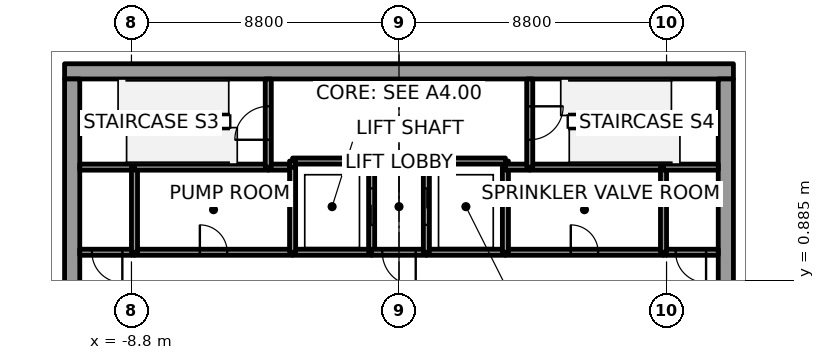
"""IFC4 building model, lengths in metres.
Left out: names, types, materials, properties, quantities, classifications, styles, units other than length and angle.
Written with IfcOpenShell. Run it as: python <this file> out.ifc"""

import sys

from ifc_helpers import new_model, si_unit, direction, frame, frame_2d, origin, place, context, subcontext, project, spatial, rectangle, extrude, element, fill, save


model = new_model("IFC4")
c1 = context("Model", 3, precision=1e-05, world=origin(), true_north=direction((0.0, 1.0)))
c2 = subcontext(c1, "Body", "Model", "MODEL_VIEW")
j1 = project(units=[si_unit("LENGTHUNIT", "METRE"), si_unit("PLANEANGLEUNIT", "RADIAN")], contexts=[c1])
p1 = place(None, origin())
s1 = spatial("IfcSite", under=j1, at=p1, CompositionType="ELEMENT")
p2 = place(p1, origin())
s2 = spatial("IfcBuilding", under=s1, at=p2, CompositionType="ELEMENT")
p3 = place(p2, frame((0.0, 0.0, -9.0)))
s3 = spatial("IfcBuildingStorey", under=s2, at=p3, CompositionType="ELEMENT", Elevation=-9.0)
p4 = place(p3, frame((-11.0, 7.75, 0.0), z_axis=(0.0, 0.0, 1.0), x_axis=(1.0, 0.0, 0.0)))
e1 = element("IfcWall", 1, at=p4, inside=s3, PredefinedType="SHEAR", context=c2, shape_type="SweptSolid", body=[
    extrude(rectangle(XDim=22.0, YDim=0.5, at=frame_2d((11.0, 0.0))), origin(), (0.0, 0.0, 1.0), 4.5),
])
for number, where, z_axis, x_axis in (
    (2, (-10.75, -7.5, 0.0), (0.0, 0.0, 1.0), (0.0, 1.0, 0.0)),
    (3, (10.75, -7.5, 0.0), (0.0, 0.0, 1.0), (0.0, 1.0, 0.0)),
):
    element("IfcWall", number, at=place(p3, frame(where, z_axis=z_axis, x_axis=x_axis)), inside=s3, PredefinedType="SHEAR", context=c2, shape_type="SweptSolid", body=[
        extrude(rectangle(XDim=15.0, YDim=0.5, at=frame_2d((7.5, 0.0))), origin(), (0.0, 0.0, 1.0), 4.5),
    ])
p5 = place(p3, frame((-8.7, 1.8, 0.0), z_axis=(0.0, 0.0, 1.0), x_axis=(-1.0, 0.0, 0.0)))
e4 = element("IfcWall", 4, at=p5, inside=s3, PredefinedType="SOLIDWALL", context=c2, shape_type="SweptSolid", body=[
    extrude(rectangle(XDim=1.8, YDim=0.2, at=frame_2d((0.9, 0.0))), origin(), (0.0, 0.0, 1.0), 4.35),
])
p6 = place(p5, frame((0.4, 0.0, 0.0)))
e5 = element("IfcOpeningElement", 5, at=p6, cuts=e4, PredefinedType="OPENING", context=c2, shape_type="SweptSolid", body=[
    extrude(rectangle(XDim=1.0, YDim=2.4, at=frame_2d((0.5, 1.2))), frame((0.0, 0.1, 0.0), z_axis=(0.0, -1.0, 0.0), x_axis=(1.0, 0.0, 0.0)), (0.0, 0.0, 1.0), 0.2),
])
p7 = place(p3, frame((-8.7, 4.6, 0.0), z_axis=(0.0, 0.0, 1.0), x_axis=(-1.0, 0.0, 0.0)))
e6 = element("IfcWall", 6, at=p7, inside=s3, PredefinedType="SOLIDWALL", context=c2, shape_type="SweptSolid", body=[
    extrude(rectangle(XDim=1.8, YDim=0.2, at=frame_2d((0.9, 0.0))), origin(), (0.0, 0.0, 1.0), 4.35),
])
p8 = place(p3, frame((-8.7, 1.8, 0.0), z_axis=(0.0, 0.0, 1.0), x_axis=(1.0, 0.0, 0.0)))
e7 = element("IfcWall", 7, at=p8, inside=s3, PredefinedType="SOLIDWALL", context=c2, shape_type="SweptSolid", body=[
    extrude(rectangle(XDim=5.2, YDim=0.2, at=frame_2d((2.6, 0.0))), origin(), (0.0, 0.0, 1.0), 4.35),
])
p9 = place(p8, frame((2.15, 0.0, 0.0)))
e8 = element("IfcOpeningElement", 8, at=p9, cuts=e7, PredefinedType="OPENING", context=c2, shape_type="SweptSolid", body=[
    extrude(rectangle(XDim=0.9, YDim=2.4, at=frame_2d((0.45, 1.2))), frame((0.0, 0.1, 0.0), z_axis=(0.0, -1.0, 0.0), x_axis=(1.0, 0.0, 0.0)), (0.0, 0.0, 1.0), 0.2),
])
p10 = place(p3, frame((-8.7, 4.6, 0.0), z_axis=(0.0, 0.0, 1.0), x_axis=(0.0, -1.0, 0.0)))
e9 = element("IfcWall", 9, at=p10, inside=s3, PredefinedType="SOLIDWALL", context=c2, shape_type="SweptSolid", body=[
    extrude(rectangle(XDim=2.8, YDim=0.2, at=frame_2d((1.4, 0.0))), origin(), (0.0, 0.0, 1.0), 4.35),
])
p11 = place(p3, frame((-4.3, 4.6, 0.0), z_axis=(0.0, 0.0, 1.0), x_axis=(-1.0, 0.0, 0.0)))
e10 = element("IfcWall", 10, at=p11, inside=s3, PredefinedType="SOLIDWALL", context=c2, shape_type="SweptSolid", body=[
    extrude(rectangle(XDim=4.4, YDim=0.2, at=frame_2d((2.2, 0.0))), origin(), (0.0, 0.0, 1.0), 4.35),
])
p12 = place(p3, frame((-3.5, 4.6, 0.0), z_axis=(0.0, 0.0, 1.0), x_axis=(-1.0, 0.0, 0.0)))
e11 = element("IfcWall", 11, at=p12, inside=s3, PredefinedType="SOLIDWALL", context=c2, shape_type="SweptSolid", body=[
    extrude(rectangle(XDim=0.8, YDim=0.2, at=frame_2d((0.4, 0.0))), origin(), (0.0, 0.0, 1.0), 4.35),
])
p13 = place(p3, frame((-4.3, 4.6, 0.0), z_axis=(0.0, 0.0, 1.0), x_axis=(0.0, 1.0, 0.0)))
e12 = element("IfcWall", 12, at=p13, inside=s3, PredefinedType="SOLIDWALL", context=c2, shape_type="SweptSolid", body=[
    extrude(rectangle(XDim=2.9, YDim=0.2, at=frame_2d((1.45, 0.0))), origin(), (0.0, 0.0, 1.0), 4.35),
])
p14 = place(p13, frame((0.9, 0.0, 0.0)))
e13 = element("IfcOpeningElement", 13, at=p14, cuts=e12, PredefinedType="OPENING", context=c2, shape_type="SweptSolid", body=[
    extrude(rectangle(XDim=1.1, YDim=2.4, at=frame_2d((0.55, 1.2))), frame((0.0, 0.1, 0.0), z_axis=(0.0, -1.0, 0.0), x_axis=(1.0, 0.0, 0.0)), (0.0, 0.0, 1.0), 0.2),
])
p15 = place(p3, frame((-0.9, 1.8, 0.0), z_axis=(0.0, 0.0, 1.0), x_axis=(-1.0, 0.0, 0.0)))
e14 = element("IfcWall", 14, at=p15, inside=s3, PredefinedType="SOLIDWALL", context=c2, shape_type="SweptSolid", body=[
    extrude(rectangle(XDim=2.6, YDim=0.2, at=frame_2d((1.3, 0.0))), origin(), (0.0, 0.0, 1.0), 4.35),
])
p16 = place(p3, frame((-3.5, 1.8, 0.0), z_axis=(0.0, 0.0, 1.0), x_axis=(0.0, 1.0, 0.0)))
e15 = element("IfcWall", 15, at=p16, inside=s3, PredefinedType="SOLIDWALL", context=c2, shape_type="SweptSolid", body=[
    extrude(rectangle(XDim=2.8, YDim=0.2, at=frame_2d((1.4, 0.0))), origin(), (0.0, 0.0, 1.0), 4.35),
])
p17 = place(p3, frame((-0.9, 1.8, 0.0), z_axis=(0.0, 0.0, 1.0), x_axis=(0.0, 1.0, 0.0)))
e16 = element("IfcWall", 16, at=p17, inside=s3, PredefinedType="SOLIDWALL", context=c2, shape_type="SweptSolid", body=[
    extrude(rectangle(XDim=3.0, YDim=0.2, at=frame_2d((1.5, 0.0))), origin(), (0.0, 0.0, 1.0), 4.35),
])
p18 = place(p17, frame((0.9, 0.0, 0.0)))
e17 = element("IfcOpeningElement", 17, at=p18, cuts=e16, PredefinedType="OPENING", context=c2, shape_type="SweptSolid", body=[
    extrude(rectangle(XDim=1.2, YDim=2.1, at=frame_2d((0.6, 1.05))), frame((0.0, 0.1, 0.0), z_axis=(0.0, -1.0, 0.0), x_axis=(1.0, 0.0, 0.0)), (0.0, 0.0, 1.0), 0.2),
])
p19 = place(p3, frame((-0.9, 4.8, 0.0), z_axis=(0.0, 0.0, 1.0), x_axis=(-1.0, 0.0, 0.0)))
e18 = element("IfcWall", 18, at=p19, inside=s3, PredefinedType="SOLIDWALL", context=c2, shape_type="SweptSolid", body=[
    extrude(rectangle(XDim=2.6, YDim=0.2, at=frame_2d((1.3, 0.0))), origin(), (0.0, 0.0, 1.0), 4.35),
])
p20 = place(p3, frame((-3.5, 4.8, 0.0), z_axis=(0.0, 0.0, 1.0), x_axis=(0.0, -1.0, 0.0)))
e19 = element("IfcWall", 19, at=p20, inside=s3, PredefinedType="SOLIDWALL", context=c2, shape_type="SweptSolid", body=[
    extrude(rectangle(XDim=0.2, YDim=0.2, at=frame_2d((0.1, 0.0))), origin(), (0.0, 0.0, 1.0), 4.35),
])
p21 = place(p3, frame((0.9, 1.8, 0.0), z_axis=(0.0, 0.0, 1.0), x_axis=(-1.0, 0.0, 0.0)))
e20 = element("IfcWall", 20, at=p21, inside=s3, PredefinedType="SOLIDWALL", context=c2, shape_type="SweptSolid", body=[
    extrude(rectangle(XDim=1.8, YDim=0.2, at=frame_2d((0.9, 0.0))), origin(), (0.0, 0.0, 1.0), 4.35),
])
p22 = place(p21, frame((0.35, 0.0, 0.0)))
e21 = element("IfcOpeningElement", 21, at=p22, cuts=e20, PredefinedType="OPENING", context=c2, shape_type="SweptSolid", body=[
    extrude(rectangle(XDim=1.1, YDim=2.4, at=frame_2d((0.55, 1.2))), frame((0.0, 0.1, 0.0), z_axis=(0.0, -1.0, 0.0), x_axis=(1.0, 0.0, 0.0)), (0.0, 0.0, 1.0), 0.2),
])
p23 = place(p3, frame((3.5, 1.8, 0.0), z_axis=(0.0, 0.0, 1.0), x_axis=(-1.0, 0.0, 0.0)))
e22 = element("IfcWall", 22, at=p23, inside=s3, PredefinedType="SOLIDWALL", context=c2, shape_type="SweptSolid", body=[
    extrude(rectangle(XDim=2.6, YDim=0.2, at=frame_2d((1.3, 0.0))), origin(), (0.0, 0.0, 1.0), 4.35),
])
p24 = place(p3, frame((3.5, 4.6, 0.0), z_axis=(0.0, 0.0, 1.0), x_axis=(0.0, 1.0, 0.0)))
e23 = element("IfcWall", 23, at=p24, inside=s3, PredefinedType="SOLIDWALL", context=c2, shape_type="SweptSolid", body=[
    extrude(rectangle(XDim=0.2, YDim=0.2, at=frame_2d((0.1, 0.0))), origin(), (0.0, 0.0, 1.0), 4.35),
])
p25 = place(p3, frame((3.5, 4.8, 0.0), z_axis=(0.0, 0.0, 1.0), x_axis=(-1.0, 0.0, 0.0)))
e24 = element("IfcWall", 24, at=p25, inside=s3, PredefinedType="SOLIDWALL", context=c2, shape_type="SweptSolid", body=[
    extrude(rectangle(XDim=2.6, YDim=0.2, at=frame_2d((1.3, 0.0))), origin(), (0.0, 0.0, 1.0), 4.35),
])
p26 = place(p3, frame((0.9, 4.8, 0.0), z_axis=(0.0, 0.0, 1.0), x_axis=(0.0, -1.0, 0.0)))
e25 = element("IfcWall", 25, at=p26, inside=s3, PredefinedType="SOLIDWALL", context=c2, shape_type="SweptSolid", body=[
    extrude(rectangle(XDim=3.0, YDim=0.2, at=frame_2d((1.5, 0.0))), origin(), (0.0, 0.0, 1.0), 4.35),
])
p27 = place(p26, frame((0.9, 0.0, 0.0)))
e26 = element("IfcOpeningElement", 26, at=p27, cuts=e25, PredefinedType="OPENING", context=c2, shape_type="SweptSolid", body=[
    extrude(rectangle(XDim=1.2, YDim=2.1, at=frame_2d((0.6, 1.05))), frame((0.0, 0.1, 0.0), z_axis=(0.0, -1.0, 0.0), x_axis=(1.0, 0.0, 0.0)), (0.0, 0.0, 1.0), 0.2),
])
p28 = place(p3, frame((3.5, 1.8, 0.0), z_axis=(0.0, 0.0, 1.0), x_axis=(1.0, 0.0, 0.0)))
e27 = element("IfcWall", 27, at=p28, inside=s3, PredefinedType="SOLIDWALL", context=c2, shape_type="SweptSolid", body=[
    extrude(rectangle(XDim=5.2, YDim=0.2, at=frame_2d((2.6, 0.0))), origin(), (0.0, 0.0, 1.0), 4.35),
])
p29 = place(p28, frame((2.15, 0.0, 0.0)))
e28 = element("IfcOpeningElement", 28, at=p29, cuts=e27, PredefinedType="OPENING", context=c2, shape_type="SweptSolid", body=[
    extrude(rectangle(XDim=0.9, YDim=2.4, at=frame_2d((0.45, 1.2))), frame((0.0, 0.1, 0.0), z_axis=(0.0, -1.0, 0.0), x_axis=(1.0, 0.0, 0.0)), (0.0, 0.0, 1.0), 0.2),
])
p30 = place(p3, frame((3.5, 4.6, 0.0), z_axis=(0.0, 0.0, 1.0), x_axis=(0.0, -1.0, 0.0)))
e29 = element("IfcWall", 29, at=p30, inside=s3, PredefinedType="SOLIDWALL", context=c2, shape_type="SweptSolid", body=[
    extrude(rectangle(XDim=2.8, YDim=0.2, at=frame_2d((1.4, 0.0))), origin(), (0.0, 0.0, 1.0), 4.35),
])
p31 = place(p3, frame((4.3, 4.6, 0.0), z_axis=(0.0, 0.0, 1.0), x_axis=(-1.0, 0.0, 0.0)))
e30 = element("IfcWall", 30, at=p31, inside=s3, PredefinedType="SOLIDWALL", context=c2, shape_type="SweptSolid", body=[
    extrude(rectangle(XDim=0.8, YDim=0.2, at=frame_2d((0.4, 0.0))), origin(), (0.0, 0.0, 1.0), 4.35),
])
p32 = place(p3, frame((8.7, 4.6, 0.0), z_axis=(0.0, 0.0, 1.0), x_axis=(-1.0, 0.0, 0.0)))
e31 = element("IfcWall", 31, at=p32, inside=s3, PredefinedType="SOLIDWALL", context=c2, shape_type="SweptSolid", body=[
    extrude(rectangle(XDim=4.4, YDim=0.2, at=frame_2d((2.2, 0.0))), origin(), (0.0, 0.0, 1.0), 4.35),
])
p33 = place(p3, frame((4.3, 7.5, 0.0), z_axis=(0.0, 0.0, 1.0), x_axis=(0.0, -1.0, 0.0)))
e32 = element("IfcWall", 32, at=p33, inside=s3, PredefinedType="SOLIDWALL", context=c2, shape_type="SweptSolid", body=[
    extrude(rectangle(XDim=2.9, YDim=0.2, at=frame_2d((1.45, 0.0))), origin(), (0.0, 0.0, 1.0), 4.35),
])
p34 = place(p33, frame((0.9, 0.0, 0.0)))
e33 = element("IfcOpeningElement", 33, at=p34, cuts=e32, PredefinedType="OPENING", context=c2, shape_type="SweptSolid", body=[
    extrude(rectangle(XDim=1.1, YDim=2.4, at=frame_2d((0.55, 1.2))), frame((0.0, 0.1, 0.0), z_axis=(0.0, -1.0, 0.0), x_axis=(1.0, 0.0, 0.0)), (0.0, 0.0, 1.0), 0.2),
])
p35 = place(p3, frame((10.5, 1.8, 0.0), z_axis=(0.0, 0.0, 1.0), x_axis=(-1.0, 0.0, 0.0)))
e34 = element("IfcWall", 34, at=p35, inside=s3, PredefinedType="SOLIDWALL", context=c2, shape_type="SweptSolid", body=[
    extrude(rectangle(XDim=1.8, YDim=0.2, at=frame_2d((0.9, 0.0))), origin(), (0.0, 0.0, 1.0), 4.35),
])
p36 = place(p35, frame((0.4, 0.0, 0.0)))
e35 = element("IfcOpeningElement", 35, at=p36, cuts=e34, PredefinedType="OPENING", context=c2, shape_type="SweptSolid", body=[
    extrude(rectangle(XDim=1.0, YDim=2.4, at=frame_2d((0.5, 1.2))), frame((0.0, 0.1, 0.0), z_axis=(0.0, -1.0, 0.0), x_axis=(1.0, 0.0, 0.0)), (0.0, 0.0, 1.0), 0.2),
])
p37 = place(p3, frame((8.7, 1.8, 0.0), z_axis=(0.0, 0.0, 1.0), x_axis=(0.0, 1.0, 0.0)))
e36 = element("IfcWall", 36, at=p37, inside=s3, PredefinedType="SOLIDWALL", context=c2, shape_type="SweptSolid", body=[
    extrude(rectangle(XDim=2.8, YDim=0.2, at=frame_2d((1.4, 0.0))), origin(), (0.0, 0.0, 1.0), 4.35),
])
p38 = place(p3, frame((10.5, 4.6, 0.0), z_axis=(0.0, 0.0, 1.0), x_axis=(-1.0, 0.0, 0.0)))
e37 = element("IfcWall", 37, at=p38, inside=s3, PredefinedType="SOLIDWALL", context=c2, shape_type="SweptSolid", body=[
    extrude(rectangle(XDim=1.8, YDim=0.2, at=frame_2d((0.9, 0.0))), origin(), (0.0, 0.0, 1.0), 4.35),
])
p39 = place(p18, origin())
e38 = element("IfcDoor", 38, at=p39, inside=s3, OperationType="SLIDING_TO_LEFT", PredefinedType="DOOR", context=c2, shape_type="SweptSolid", body=[
    extrude(rectangle(XDim=1.2, YDim=2.1, at=frame_2d((0.6, 1.05))), frame((0.0, 0.025, 0.0), z_axis=(0.0, -1.0, 0.0), x_axis=(1.0, 0.0, 0.0)), (0.0, 0.0, 1.0), 0.05),
])
fill(e17, e38)
p40 = place(p27, origin())
e39 = element("IfcDoor", 39, at=p40, inside=s3, OperationType="SLIDING_TO_RIGHT", PredefinedType="DOOR", context=c2, shape_type="SweptSolid", body=[
    extrude(rectangle(XDim=1.2, YDim=2.1, at=frame_2d((0.6, 1.05))), frame((0.0, 0.025, 0.0), z_axis=(0.0, -1.0, 0.0), x_axis=(1.0, 0.0, 0.0)), (0.0, 0.0, 1.0), 0.05),
])
fill(e26, e39)
p41 = place(p22, origin())
e40 = element("IfcDoor", 40, at=p41, inside=s3, OperationType="SINGLE_SWING_LEFT", PredefinedType="DOOR", context=c2, shape_type="SweptSolid", body=[
    extrude(rectangle(XDim=1.1, YDim=2.4, at=frame_2d((0.55, 1.2))), frame((0.0, 0.025, 0.0), z_axis=(0.0, -1.0, 0.0), x_axis=(1.0, 0.0, 0.0)), (0.0, 0.0, 1.0), 0.05),
])
fill(e21, e40)
p42 = place(p6, origin())
e41 = element("IfcDoor", 41, at=p42, inside=s3, OperationType="SINGLE_SWING_LEFT", PredefinedType="DOOR", context=c2, shape_type="SweptSolid", body=[
    extrude(rectangle(XDim=1.0, YDim=2.4, at=frame_2d((0.5, 1.2))), frame((0.0, 0.025, 0.0), z_axis=(0.0, -1.0, 0.0), x_axis=(1.0, 0.0, 0.0)), (0.0, 0.0, 1.0), 0.05),
])
fill(e5, e41)
p43 = place(p36, origin())
e42 = element("IfcDoor", 42, at=p43, inside=s3, OperationType="SINGLE_SWING_RIGHT", PredefinedType="DOOR", context=c2, shape_type="SweptSolid", body=[
    extrude(rectangle(XDim=1.0, YDim=2.4, at=frame_2d((0.5, 1.2))), frame((0.0, 0.025, 0.0), z_axis=(0.0, -1.0, 0.0), x_axis=(1.0, 0.0, 0.0)), (0.0, 0.0, 1.0), 0.05),
])
fill(e35, e42)
p44 = place(p14, origin())
e43 = element("IfcDoor", 43, at=p44, inside=s3, OperationType="SINGLE_SWING_RIGHT", PredefinedType="DOOR", context=c2, shape_type="SweptSolid", body=[
    extrude(rectangle(XDim=1.1, YDim=2.4, at=frame_2d((0.55, 1.2))), frame((0.0, 0.025, 0.0), z_axis=(0.0, -1.0, 0.0), x_axis=(1.0, 0.0, 0.0)), (0.0, 0.0, 1.0), 0.05),
])
fill(e13, e43)
p45 = place(p34, origin())
e44 = element("IfcDoor", 44, at=p45, inside=s3, OperationType="SINGLE_SWING_RIGHT", PredefinedType="DOOR", context=c2, shape_type="SweptSolid", body=[
    extrude(rectangle(XDim=1.1, YDim=2.4, at=frame_2d((0.55, 1.2))), frame((0.0, 0.025, 0.0), z_axis=(0.0, -1.0, 0.0), x_axis=(1.0, 0.0, 0.0)), (0.0, 0.0, 1.0), 0.05),
])
fill(e33, e44)
p46 = place(p29, origin())
e45 = element("IfcDoor", 45, at=p46, inside=s3, OperationType="SINGLE_SWING_LEFT", PredefinedType="DOOR", context=c2, shape_type="SweptSolid", body=[
    extrude(rectangle(XDim=0.9, YDim=2.4, at=frame_2d((0.45, 1.2))), frame((0.0, 0.025, 0.0), z_axis=(0.0, -1.0, 0.0), x_axis=(1.0, 0.0, 0.0)), (0.0, 0.0, 1.0), 0.05),
])
fill(e28, e45)
p47 = place(p9, origin())
e46 = element("IfcDoor", 46, at=p47, inside=s3, OperationType="SINGLE_SWING_LEFT", PredefinedType="DOOR", context=c2, shape_type="SweptSolid", body=[
    extrude(rectangle(XDim=0.9, YDim=2.4, at=frame_2d((0.45, 1.2))), frame((0.0, 0.025, 0.0), z_axis=(0.0, -1.0, 0.0), x_axis=(1.0, 0.0, 0.0)), (0.0, 0.0, 1.0), 0.05),
])
fill(e8, e46)
save(model, sys.argv[1])
